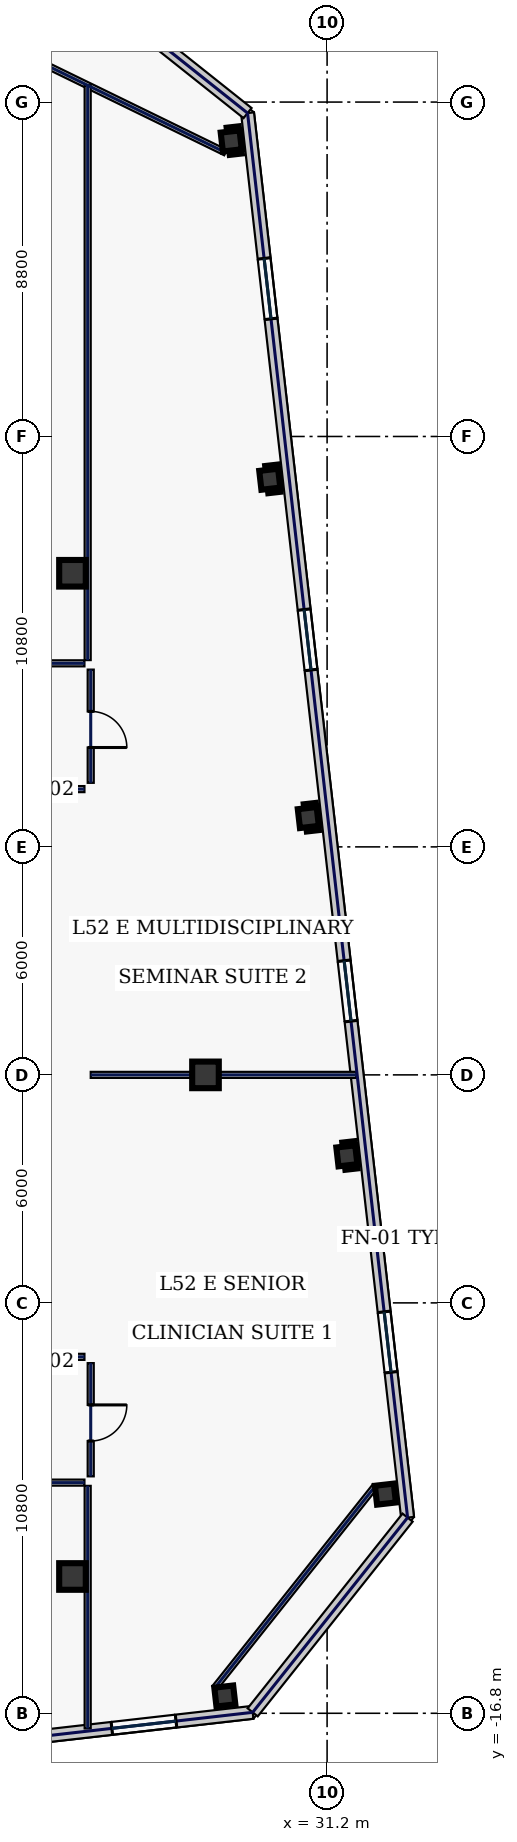
"""IFC4 building model, lengths in metres.
Left out: names, types, materials, properties, quantities, classifications, styles, units other than length and angle.
Written with IfcOpenShell. Run it as: python <this file> out.ifc"""

import sys

from ifc_helpers import new_model, si_unit, direction, frame, frame_2d, origin, origin_2d, place, context, subcontext, project, spatial, rectangle, hollow_rectangle, extrude, element, fill, save


model = new_model("IFC4")
c1 = context("Model", 3, precision=1e-05, world=origin(), true_north=direction((0.0, 1.0)))
c2 = subcontext(c1, "Body", "Model", "MODEL_VIEW")
j1 = project(units=[si_unit("LENGTHUNIT", "METRE"), si_unit("PLANEANGLEUNIT", "RADIAN")], contexts=[c1])
p1 = place(None, origin())
s1 = spatial("IfcSite", under=j1, at=p1, CompositionType="ELEMENT")
p2 = place(p1, origin())
s2 = spatial("IfcBuilding", under=s1, at=p2, CompositionType="ELEMENT")
p3 = place(p2, frame((0.0, 0.0, 226.2)))
s3 = spatial("IfcBuildingStorey", under=s2, at=p3, CompositionType="ELEMENT", Elevation=226.2)
for number, where, z_axis, x_axis in (
    (1, (24.5, -13.2, 0.0), (0.0, 0.0, 1.0), (1.0, 0.0, 0.0)),
    (2, (24.5, 13.2, 0.0), (0.0, 0.0, 1.0), (1.0, 0.0, 0.0)),
    (3, (28.0, 0.0, 0.0), (0.0, 0.0, 1.0), (1.0, 0.0, 0.0)),
):
    element("IfcColumn", number, at=place(p3, frame(where, z_axis=z_axis, x_axis=x_axis)), inside=s3, PredefinedType="COLUMN", context=c2, shape_type="SweptSolid", body=[
        extrude(hollow_rectangle(XDim=0.7, YDim=0.7, WallThickness=0.032, at=origin_2d()), origin(), (0.0, 0.0, 1.0), 3.74),
    ])
for number, where, z_axis, x_axis in (
    (4, (28.509, -16.345, 0.0), (0.0, 0.0, 1.0), (0.994, 0.113, 0.0)),
    (5, (32.734, -11.033, 0.0), (0.0, 0.0, 1.0), (0.994, 0.113, 0.0)),
    (6, (31.72, -2.131, 0.0), (0.0, 0.0, 1.0), (0.994, 0.113, 0.0)),
    (7, (30.706, 6.772, 0.0), (0.0, 0.0, 1.0), (0.994, 0.113, 0.0)),
    (8, (29.691, 15.674, 0.0), (0.0, 0.0, 1.0), (0.994, 0.113, 0.0)),
    (9, (28.677, 24.577, 0.0), (0.0, 0.0, 1.0), (0.994, 0.113, 0.0)),
):
    element("IfcColumn", number, at=place(p3, frame(where, z_axis=z_axis, x_axis=x_axis)), inside=s3, PredefinedType="COLUMN", context=c2, shape_type="SweptSolid", body=[
        extrude(hollow_rectangle(XDim=0.5, YDim=0.5, WallThickness=0.025, at=origin_2d()), origin(), (0.0, 0.0, 1.0), 3.74),
    ])
p4 = place(p3, frame((10.71, -18.886, 0.0), z_axis=(0.0, 0.0, 1.0), x_axis=(0.993572271362, 0.113199565282, 0.0)))
e10 = element("IfcWall", 10, at=p4, inside=s3, PredefinedType="STANDARD", context=c2, shape_type="SweptSolid", body=[
    extrude(rectangle(XDim=18.651, YDim=0.34, at=frame_2d((9.326, 0.0))), origin(), (0.0, 0.0, 1.0), 3.74),
])
p5 = place(p4, frame((3.024, 0.0, 0.88)))
e11 = element("IfcOpeningElement", 11, at=p5, cuts=e10, PredefinedType="OPENING", context=c2, shape_type="SweptSolid", body=[
    extrude(rectangle(XDim=1.7, YDim=1.95, at=frame_2d((0.85, 0.975))), frame((0.0, 0.18, 0.0), z_axis=(0.0, -1.0, 0.0), x_axis=(1.0, 0.0, 0.0)), (0.0, 0.0, 1.0), 0.36),
])
p6 = place(p4, frame((6.773, 0.0, 0.88)))
e12 = element("IfcOpeningElement", 12, at=p6, cuts=e10, PredefinedType="OPENING", context=c2, shape_type="SweptSolid", body=[
    extrude(rectangle(XDim=1.7, YDim=1.95, at=frame_2d((0.85, 0.975))), frame((0.0, 0.18, 0.0), z_axis=(0.0, -1.0, 0.0), x_axis=(1.0, 0.0, 0.0)), (0.0, 0.0, 1.0), 0.36),
])
p7 = place(p4, frame((11.173, 0.0, 0.88)))
e13 = element("IfcOpeningElement", 13, at=p7, cuts=e10, PredefinedType="OPENING", context=c2, shape_type="SweptSolid", body=[
    extrude(rectangle(XDim=1.7, YDim=1.95, at=frame_2d((0.85, 0.975))), frame((0.0, 0.18, 0.0), z_axis=(0.0, -1.0, 0.0), x_axis=(1.0, 0.0, 0.0)), (0.0, 0.0, 1.0), 0.36),
])
p8 = place(p4, frame((14.921, 0.0, 0.88)))
e14 = element("IfcOpeningElement", 14, at=p8, cuts=e10, PredefinedType="OPENING", context=c2, shape_type="SweptSolid", body=[
    extrude(rectangle(XDim=1.7, YDim=1.95, at=frame_2d((0.85, 0.975))), frame((0.0, 0.18, 0.0), z_axis=(0.0, -1.0, 0.0), x_axis=(1.0, 0.0, 0.0)), (0.0, 0.0, 1.0), 0.36),
])
p9 = place(p3, frame((33.318, -11.651, 0.0), z_axis=(0.0, 0.0, 1.0), x_axis=(-0.11320360501, 0.9935718111, 0.0)))
e15 = element("IfcWall", 15, at=p9, inside=s3, PredefinedType="STANDARD", context=c2, shape_type="SweptSolid", body=[
    extrude(rectangle(XDim=37.2, YDim=0.34, at=frame_2d((18.6, 0.0))), origin(), (0.0, 0.0, 1.0), 3.74),
])
p10 = place(p9, frame((3.85, 0.0, 0.58)))
e16 = element("IfcOpeningElement", 16, at=p10, cuts=e15, PredefinedType="OPENING", context=c2, shape_type="SweptSolid", body=[
    extrude(rectangle(XDim=1.6, YDim=2.3, at=frame_2d((0.8, 1.15))), frame((0.0, 0.18, 0.0), z_axis=(0.0, -1.0, 0.0), x_axis=(1.0, 0.0, 0.0)), (0.0, 0.0, 1.0), 0.36),
])
p11 = place(p9, frame((13.15, 0.0, 0.58)))
e17 = element("IfcOpeningElement", 17, at=p11, cuts=e15, PredefinedType="OPENING", context=c2, shape_type="SweptSolid", body=[
    extrude(rectangle(XDim=1.6, YDim=2.3, at=frame_2d((0.8, 1.15))), frame((0.0, 0.18, 0.0), z_axis=(0.0, -1.0, 0.0), x_axis=(1.0, 0.0, 0.0)), (0.0, 0.0, 1.0), 0.36),
])
p12 = place(p9, frame((22.45, 0.0, 0.58)))
e18 = element("IfcOpeningElement", 18, at=p12, cuts=e15, PredefinedType="OPENING", context=c2, shape_type="SweptSolid", body=[
    extrude(rectangle(XDim=1.6, YDim=2.3, at=frame_2d((0.8, 1.15))), frame((0.0, 0.18, 0.0), z_axis=(0.0, -1.0, 0.0), x_axis=(1.0, 0.0, 0.0)), (0.0, 0.0, 1.0), 0.36),
])
p13 = place(p9, frame((31.75, 0.0, 0.58)))
e19 = element("IfcOpeningElement", 19, at=p13, cuts=e15, PredefinedType="OPENING", context=c2, shape_type="SweptSolid", body=[
    extrude(rectangle(XDim=1.6, YDim=2.3, at=frame_2d((0.8, 1.15))), frame((0.0, 0.18, 0.0), z_axis=(0.0, -1.0, 0.0), x_axis=(1.0, 0.0, 0.0)), (0.0, 0.0, 1.0), 0.36),
])
for number, where, z_axis, x_axis in (
    (20, (29.242, -16.775, 0.0), (0.0, 0.0, 1.0), (0.623, 0.783, 0.0)),
    (21, (29.107, 25.31, 0.0), (0.0, 0.0, 1.0), (-0.783, 0.623, 0.0)),
):
    element("IfcWall", number, at=place(p3, frame(where, z_axis=z_axis, x_axis=x_axis)), inside=s3, PredefinedType="STANDARD", context=c2, shape_type="SweptSolid", body=[
        extrude(rectangle(XDim=6.548, YDim=0.34, at=frame_2d((3.274, 0.0))), origin(), (0.0, 0.0, 1.0), 3.74),
    ])
p14 = place(p3, frame((28.242, -16.134, 0.0), z_axis=(0.0, 0.0, 1.0), x_axis=(0.622521563328, 0.782602647064, 0.0)))
e22 = element("IfcWall", 22, at=p14, inside=s3, PredefinedType="PARTITIONING", context=c2, shape_type="SweptSolid", body=[
    extrude(rectangle(XDim=6.788, YDim=0.16, at=frame_2d((3.394, 0.0))), origin(), (0.0, 0.0, 1.0), 3.74),
])
p15 = place(p3, frame((28.528, 24.271, 0.0), z_axis=(0.0, 0.0, 1.0), x_axis=(-0.898820692789, 0.438316509173, 0.0)))
e23 = element("IfcWall", 23, at=p15, inside=s3, PredefinedType="PARTITIONING", context=c2, shape_type="SweptSolid", body=[
    extrude(rectangle(XDim=6.107, YDim=0.16, at=frame_2d((3.053, 0.0))), origin(), (0.0, 0.0, 1.0), 3.74),
])
p16 = place(p3, frame((-24.815, 10.83, 0.0), z_axis=(0.0, 0.0, 1.0), x_axis=(1.0, 0.0, 0.0)))
e24 = element("IfcWall", 24, at=p16, inside=s3, PredefinedType="PARTITIONING", context=c2, shape_type="SweptSolid", body=[
    extrude(rectangle(XDim=49.63, YDim=0.16, at=frame_2d((24.815, 0.0))), origin(), (0.0, 0.0, 1.0), 3.74),
])
p17 = place(p16, frame((1.869, 0.0, 0.0)))
e25 = element("IfcOpeningElement", 25, at=p17, cuts=e24, PredefinedType="OPENING", context=c2, shape_type="SweptSolid", body=[
    extrude(rectangle(XDim=1.3, YDim=2.2, at=frame_2d((0.65, 1.1))), frame((0.0, 0.09, 0.0), z_axis=(0.0, -1.0, 0.0), x_axis=(1.0, 0.0, 0.0)), (0.0, 0.0, 1.0), 0.18),
])
p18 = place(p16, frame((9.5, 0.0, 0.0)))
e26 = element("IfcOpeningElement", 26, at=p18, cuts=e24, PredefinedType="OPENING", context=c2, shape_type="SweptSolid", body=[
    extrude(rectangle(XDim=0.95, YDim=2.2, at=frame_2d((0.475, 1.1))), frame((0.0, 0.09, 0.0), z_axis=(0.0, -1.0, 0.0), x_axis=(1.0, 0.0, 0.0)), (0.0, 0.0, 1.0), 0.18),
])
p19 = place(p16, frame((17.425, 0.0, 0.0)))
e27 = element("IfcOpeningElement", 27, at=p19, cuts=e24, PredefinedType="OPENING", context=c2, shape_type="SweptSolid", body=[
    extrude(rectangle(XDim=1.3, YDim=2.2, at=frame_2d((0.65, 1.1))), frame((0.0, 0.09, 0.0), z_axis=(0.0, -1.0, 0.0), x_axis=(1.0, 0.0, 0.0)), (0.0, 0.0, 1.0), 0.18),
])
p20 = place(p16, frame((22.525, 0.0, 0.0)))
e28 = element("IfcOpeningElement", 28, at=p20, cuts=e24, PredefinedType="OPENING", context=c2, shape_type="SweptSolid", body=[
    extrude(rectangle(XDim=1.45, YDim=2.2, at=frame_2d((0.725, 1.1))), frame((0.0, 0.09, 0.0), z_axis=(0.0, -1.0, 0.0), x_axis=(1.0, 0.0, 0.0)), (0.0, 0.0, 1.0), 0.18),
])
p21 = place(p16, frame((27.8, 0.0, 0.0)))
e29 = element("IfcOpeningElement", 29, at=p21, cuts=e24, PredefinedType="OPENING", context=c2, shape_type="SweptSolid", body=[
    extrude(rectangle(XDim=0.95, YDim=2.2, at=frame_2d((0.475, 1.1))), frame((0.0, 0.09, 0.0), z_axis=(0.0, -1.0, 0.0), x_axis=(1.0, 0.0, 0.0)), (0.0, 0.0, 1.0), 0.18),
])
p22 = place(p16, frame((32.725, 0.0, 0.0)))
e30 = element("IfcOpeningElement", 30, at=p22, cuts=e24, PredefinedType="OPENING", context=c2, shape_type="SweptSolid", body=[
    extrude(rectangle(XDim=1.3, YDim=2.2, at=frame_2d((0.65, 1.1))), frame((0.0, 0.09, 0.0), z_axis=(0.0, -1.0, 0.0), x_axis=(1.0, 0.0, 0.0)), (0.0, 0.0, 1.0), 0.18),
])
p23 = place(p16, frame((37.92, 0.0, 0.0)))
e31 = element("IfcOpeningElement", 31, at=p23, cuts=e24, PredefinedType="OPENING", context=c2, shape_type="SweptSolid", body=[
    extrude(rectangle(XDim=0.95, YDim=2.2, at=frame_2d((0.475, 1.1))), frame((0.0, 0.09, 0.0), z_axis=(0.0, -1.0, 0.0), x_axis=(1.0, 0.0, 0.0)), (0.0, 0.0, 1.0), 0.18),
])
p24 = place(p16, frame((42.47, 0.0, 0.0)))
e32 = element("IfcOpeningElement", 32, at=p24, cuts=e24, PredefinedType="OPENING", context=c2, shape_type="SweptSolid", body=[
    extrude(rectangle(XDim=1.05, YDim=2.2, at=frame_2d((0.525, 1.1))), frame((0.0, 0.09, 0.0), z_axis=(0.0, -1.0, 0.0), x_axis=(1.0, 0.0, 0.0)), (0.0, 0.0, 1.0), 0.18),
])
p25 = place(p16, frame((46.631, 0.0, 0.0)))
e33 = element("IfcOpeningElement", 33, at=p25, cuts=e24, PredefinedType="OPENING", context=c2, shape_type="SweptSolid", body=[
    extrude(rectangle(XDim=0.95, YDim=2.2, at=frame_2d((0.475, 1.1))), frame((0.0, 0.09, 0.0), z_axis=(0.0, -1.0, 0.0), x_axis=(1.0, 0.0, 0.0)), (0.0, 0.0, 1.0), 0.18),
])
p26 = place(p3, frame((24.98, 10.665, 0.0), z_axis=(0.0, 0.0, 1.0), x_axis=(0.0, -1.0, 0.0)))
e34 = element("IfcWall", 34, at=p26, inside=s3, PredefinedType="PARTITIONING", context=c2, shape_type="SweptSolid", body=[
    extrude(rectangle(XDim=2.98, YDim=0.16, at=frame_2d((1.49, 0.0))), origin(), (0.0, 0.0, 1.0), 3.74),
])
p27 = place(p26, frame((1.1, 0.0, 0.0)))
e35 = element("IfcOpeningElement", 35, at=p27, cuts=e34, PredefinedType="OPENING", context=c2, shape_type="SweptSolid", body=[
    extrude(rectangle(XDim=0.95, YDim=2.2, at=frame_2d((0.475, 1.1))), frame((0.0, 0.09, 0.0), z_axis=(0.0, -1.0, 0.0), x_axis=(1.0, 0.0, 0.0)), (0.0, 0.0, 1.0), 0.18),
])
for number, where, z_axis, x_axis in (
    (36, (24.815, 7.52, 0.0), (0.0, 0.0, 1.0), (-1.0, 0.0, 0.0)),
    (37, (10.715, -7.42, 0.0), (0.0, 0.0, 1.0), (1.0, 0.0, 0.0)),
):
    element("IfcWall", number, at=place(p3, frame(where, z_axis=z_axis, x_axis=x_axis)), inside=s3, PredefinedType="PARTITIONING", context=c2, shape_type="SweptSolid", body=[
        extrude(rectangle(XDim=14.1, YDim=0.16, at=frame_2d((7.05, 0.0))), origin(), (0.0, 0.0, 1.0), 3.74),
    ])
p28 = place(p3, frame((24.98, -7.585, 0.0), z_axis=(0.0, 0.0, 1.0), x_axis=(0.0, -1.0, 0.0)))
e38 = element("IfcWall", 38, at=p28, inside=s3, PredefinedType="PARTITIONING", context=c2, shape_type="SweptSolid", body=[
    extrude(rectangle(XDim=2.98, YDim=0.16, at=frame_2d((1.49, 0.0))), origin(), (0.0, 0.0, 1.0), 3.74),
])
p29 = place(p28, frame((1.1, 0.0, 0.0)))
e39 = element("IfcOpeningElement", 39, at=p29, cuts=e38, PredefinedType="OPENING", context=c2, shape_type="SweptSolid", body=[
    extrude(rectangle(XDim=0.95, YDim=2.2, at=frame_2d((0.475, 1.1))), frame((0.0, 0.09, 0.0), z_axis=(0.0, -1.0, 0.0), x_axis=(1.0, 0.0, 0.0)), (0.0, 0.0, 1.0), 0.18),
])
p30 = place(p3, frame((24.815, -10.73, 0.0), z_axis=(0.0, 0.0, 1.0), x_axis=(-1.0, 0.0, 0.0)))
e40 = element("IfcWall", 40, at=p30, inside=s3, PredefinedType="PARTITIONING", context=c2, shape_type="SweptSolid", body=[
    extrude(rectangle(XDim=49.63, YDim=0.16, at=frame_2d((24.815, 0.0))), origin(), (0.0, 0.0, 1.0), 3.74),
])
p31 = place(p30, frame((46.631, 0.0, 0.0)))
e41 = element("IfcOpeningElement", 41, at=p31, cuts=e40, PredefinedType="OPENING", context=c2, shape_type="SweptSolid", body=[
    extrude(rectangle(XDim=1.45, YDim=2.2, at=frame_2d((0.725, 1.1))), frame((0.0, 0.09, 0.0), z_axis=(0.0, -1.0, 0.0), x_axis=(1.0, 0.0, 0.0)), (0.0, 0.0, 1.0), 0.18),
])
p32 = place(p30, frame((42.13, 0.0, 0.0)))
e42 = element("IfcOpeningElement", 42, at=p32, cuts=e40, PredefinedType="OPENING", context=c2, shape_type="SweptSolid", body=[
    extrude(rectangle(XDim=0.95, YDim=2.2, at=frame_2d((0.475, 1.1))), frame((0.0, 0.09, 0.0), z_axis=(0.0, -1.0, 0.0), x_axis=(1.0, 0.0, 0.0)), (0.0, 0.0, 1.0), 0.18),
])
p33 = place(p30, frame((33.74, 0.0, 0.0)))
e43 = element("IfcOpeningElement", 43, at=p33, cuts=e40, PredefinedType="OPENING", context=c2, shape_type="SweptSolid", body=[
    extrude(rectangle(XDim=0.95, YDim=2.2, at=frame_2d((0.475, 1.1))), frame((0.0, 0.09, 0.0), z_axis=(0.0, -1.0, 0.0), x_axis=(1.0, 0.0, 0.0)), (0.0, 0.0, 1.0), 0.18),
])
p34 = place(p30, frame((25.79, 0.0, 0.0)))
e44 = element("IfcOpeningElement", 44, at=p34, cuts=e40, PredefinedType="OPENING", context=c2, shape_type="SweptSolid", body=[
    extrude(rectangle(XDim=1.05, YDim=2.2, at=frame_2d((0.525, 1.1))), frame((0.0, 0.09, 0.0), z_axis=(0.0, -1.0, 0.0), x_axis=(1.0, 0.0, 0.0)), (0.0, 0.0, 1.0), 0.18),
])
p35 = place(p30, frame((16.9, 0.0, 0.0)))
e45 = element("IfcOpeningElement", 45, at=p35, cuts=e40, PredefinedType="OPENING", context=c2, shape_type="SweptSolid", body=[
    extrude(rectangle(XDim=1.3, YDim=2.2, at=frame_2d((0.65, 1.1))), frame((0.0, 0.09, 0.0), z_axis=(0.0, -1.0, 0.0), x_axis=(1.0, 0.0, 0.0)), (0.0, 0.0, 1.0), 0.18),
])
p36 = place(p30, frame((8.4, 0.0, 0.0)))
e46 = element("IfcOpeningElement", 46, at=p36, cuts=e40, PredefinedType="OPENING", context=c2, shape_type="SweptSolid", body=[
    extrude(rectangle(XDim=1.3, YDim=2.2, at=frame_2d((0.65, 1.1))), frame((0.0, 0.09, 0.0), z_axis=(0.0, -1.0, 0.0), x_axis=(1.0, 0.0, 0.0)), (0.0, 0.0, 1.0), 0.18),
])
p37 = place(p30, frame((2.219, 0.0, 0.0)))
e47 = element("IfcOpeningElement", 47, at=p37, cuts=e40, PredefinedType="OPENING", context=c2, shape_type="SweptSolid", body=[
    extrude(rectangle(XDim=0.95, YDim=2.2, at=frame_2d((0.475, 1.1))), frame((0.0, 0.09, 0.0), z_axis=(0.0, -1.0, 0.0), x_axis=(1.0, 0.0, 0.0)), (0.0, 0.0, 1.0), 0.18),
])
p38 = place(p3, frame((24.9, 10.915, 0.0), z_axis=(0.0, 0.0, 1.0), x_axis=(0.0, 1.0, 0.0)))
e48 = element("IfcWall", 48, at=p38, inside=s3, PredefinedType="PARTITIONING", context=c2, shape_type="SweptSolid", body=[
    extrude(rectangle(XDim=15.129, YDim=0.16, at=frame_2d((7.565, 0.0))), origin(), (0.0, 0.0, 1.0), 3.74),
])
p39 = place(p3, frame((24.9, -17.199, 0.0), z_axis=(0.0, 0.0, 1.0), x_axis=(0.0, 1.0, 0.0)))
e49 = element("IfcWall", 49, at=p39, inside=s3, PredefinedType="PARTITIONING", context=c2, shape_type="SweptSolid", body=[
    extrude(rectangle(XDim=6.385, YDim=0.16, at=frame_2d((3.192, 0.0))), origin(), (0.0, 0.0, 1.0), 3.74),
])
p40 = place(p3, frame((24.98, 0.0, 0.0), z_axis=(0.0, 0.0, 1.0), x_axis=(1.0, 0.0, 0.0)))
e50 = element("IfcWall", 50, at=p40, inside=s3, PredefinedType="PARTITIONING", context=c2, shape_type="SweptSolid", body=[
    extrude(rectangle(XDim=6.99, YDim=0.16, at=frame_2d((3.495, 0.0))), origin(), (0.0, 0.0, 1.0), 3.74),
])
p41 = place(p8, origin())
e51 = element("IfcWindow", 51, at=p41, inside=s3, PartitioningType="SINGLE_PANEL", PredefinedType="WINDOW", context=c2, shape_type="SweptSolid", body=[
    extrude(rectangle(XDim=1.7, YDim=1.95, at=frame_2d((0.85, 0.975))), frame((0.0, 0.03, 0.0), z_axis=(0.0, -1.0, 0.0), x_axis=(1.0, 0.0, 0.0)), (0.0, 0.0, 1.0), 0.06),
])
fill(e14, e51)
p42 = place(p10, origin())
e52 = element("IfcWindow", 52, at=p42, inside=s3, PartitioningType="SINGLE_PANEL", PredefinedType="WINDOW", context=c2, shape_type="SweptSolid", body=[
    extrude(rectangle(XDim=1.6, YDim=2.3, at=frame_2d((0.8, 1.15))), frame((0.0, 0.03, 0.0), z_axis=(0.0, -1.0, 0.0), x_axis=(1.0, 0.0, 0.0)), (0.0, 0.0, 1.0), 0.06),
])
fill(e16, e52)
p43 = place(p11, origin())
e53 = element("IfcWindow", 53, at=p43, inside=s3, PartitioningType="SINGLE_PANEL", PredefinedType="WINDOW", context=c2, shape_type="SweptSolid", body=[
    extrude(rectangle(XDim=1.6, YDim=2.3, at=frame_2d((0.8, 1.15))), frame((0.0, 0.03, 0.0), z_axis=(0.0, -1.0, 0.0), x_axis=(1.0, 0.0, 0.0)), (0.0, 0.0, 1.0), 0.06),
])
fill(e17, e53)
p44 = place(p12, origin())
e54 = element("IfcWindow", 54, at=p44, inside=s3, PartitioningType="SINGLE_PANEL", PredefinedType="WINDOW", context=c2, shape_type="SweptSolid", body=[
    extrude(rectangle(XDim=1.6, YDim=2.3, at=frame_2d((0.8, 1.15))), frame((0.0, 0.03, 0.0), z_axis=(0.0, -1.0, 0.0), x_axis=(1.0, 0.0, 0.0)), (0.0, 0.0, 1.0), 0.06),
])
fill(e18, e54)
p45 = place(p13, origin())
e55 = element("IfcWindow", 55, at=p45, inside=s3, PartitioningType="SINGLE_PANEL", PredefinedType="WINDOW", context=c2, shape_type="SweptSolid", body=[
    extrude(rectangle(XDim=1.6, YDim=2.3, at=frame_2d((0.8, 1.15))), frame((0.0, 0.03, 0.0), z_axis=(0.0, -1.0, 0.0), x_axis=(1.0, 0.0, 0.0)), (0.0, 0.0, 1.0), 0.06),
])
fill(e19, e55)
p46 = place(p29, origin())
e56 = element("IfcDoor", 56, at=p46, inside=s3, OperationType="SINGLE_SWING_LEFT", PredefinedType="DOOR", context=c2, shape_type="SweptSolid", body=[
    extrude(rectangle(XDim=0.95, YDim=2.2, at=frame_2d((0.475, 1.1))), frame((0.0, 0.025, 0.0), z_axis=(0.0, -1.0, 0.0), x_axis=(1.0, 0.0, 0.0)), (0.0, 0.0, 1.0), 0.05),
])
fill(e39, e56)
p47 = place(p27, origin())
e57 = element("IfcDoor", 57, at=p47, inside=s3, OperationType="SINGLE_SWING_RIGHT", PredefinedType="DOOR", context=c2, shape_type="SweptSolid", body=[
    extrude(rectangle(XDim=0.95, YDim=2.2, at=frame_2d((0.475, 1.1))), frame((0.0, 0.025, 0.0), z_axis=(0.0, -1.0, 0.0), x_axis=(1.0, 0.0, 0.0)), (0.0, 0.0, 1.0), 0.05),
])
fill(e35, e57)
save(model, sys.argv[1])
